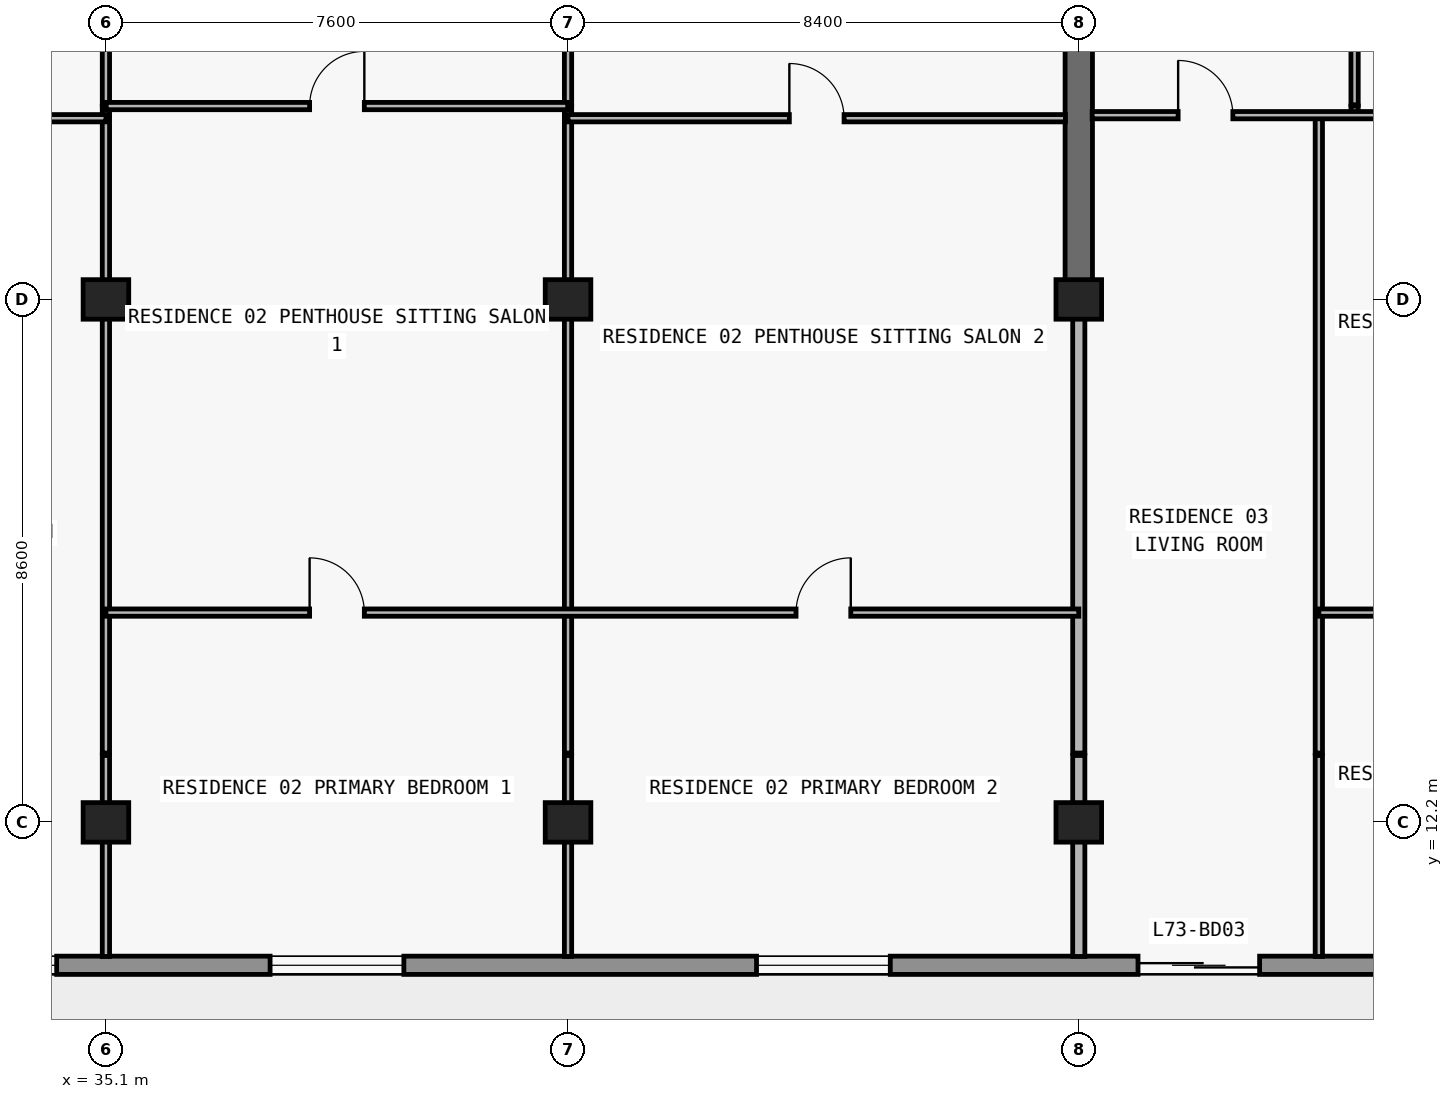
"""IFC4 building model, lengths in metres.
Left out: names, types, materials, properties, quantities, classifications, styles, units other than length and angle.
Written with IfcOpenShell. Run it as: python <this file> out.ifc"""

import sys

from ifc_helpers import new_model, si_unit, direction, frame, frame_2d, origin, origin_2d, place, context, subcontext, project, spatial, rectangle, extrude, element, fill, save


model = new_model("IFC4")
c1 = context("Model", 3, precision=1e-05, world=origin(), true_north=direction((0.0, 1.0)))
c2 = subcontext(c1, "Body", "Model", "MODEL_VIEW")
j1 = project(units=[si_unit("LENGTHUNIT", "METRE"), si_unit("PLANEANGLEUNIT", "RADIAN")], contexts=[c1])
p1 = place(None, origin())
s1 = spatial("IfcSite", under=j1, at=p1, CompositionType="ELEMENT")
p2 = place(p1, origin())
s2 = spatial("IfcBuilding", under=s1, at=p2, CompositionType="ELEMENT")
p3 = place(p2, frame((0.0, 0.0, 259.5)))
s3 = spatial("IfcBuildingStorey", under=s2, at=p3, CompositionType="ELEMENT", Elevation=259.5)
for number, where, z_axis, x_axis in (
    (1, (35.1, 12.2, 0.0), (0.0, 0.0, 1.0), (1.0, 0.0, 0.0)),
    (2, (42.7, 12.2, 0.0), (0.0, 0.0, 1.0), (1.0, 0.0, 0.0)),
    (3, (51.1, 12.2, 0.0), (0.0, 0.0, 1.0), (1.0, 0.0, 0.0)),
    (4, (35.1, 20.8, 0.0), (0.0, 0.0, 1.0), (1.0, 0.0, 0.0)),
    (5, (42.7, 20.8, 0.0), (0.0, 0.0, 1.0), (1.0, 0.0, 0.0)),
    (6, (51.1, 20.8, 0.0), (0.0, 0.0, 1.0), (1.0, 0.0, 0.0)),
):
    element("IfcColumn", number, at=place(p3, frame(where, z_axis=z_axis, x_axis=x_axis)), inside=s3, PredefinedType="COLUMN", context=c2, shape_type="SweptSolid", body=[
        extrude(rectangle(XDim=0.75, YDim=0.65, at=origin_2d()), origin(), (0.0, 0.0, 1.0), 3.05),
    ])
p4 = place(p3, frame((51.1, 20.8, 0.0), z_axis=(0.0, 0.0, 1.0), x_axis=(0.0, 1.0, 0.0)))
e7 = element("IfcWall", 7, at=p4, inside=s3, PredefinedType="SHEAR", context=c2, shape_type="SweptSolid", body=[
    extrude(rectangle(XDim=8.6, YDim=0.45, at=frame_2d((4.3, 0.0))), origin(), (0.0, 0.0, 1.0), 3.05),
])
p5 = place(p3, frame((65.7, 9.85, 0.0), z_axis=(0.0, 0.0, 1.0), x_axis=(-1.0, 0.0, 0.0)))
e8 = element("IfcWall", 8, at=p5, inside=s3, PredefinedType="STANDARD", context=c2, shape_type="SweptSolid", body=[
    extrude(rectangle(XDim=53.6, YDim=0.3, at=frame_2d((26.8, 0.0))), origin(), (0.0, 0.0, 1.0), 3.05),
])
p6 = place(p5, frame((49.5, 0.0, 0.0)))
e9 = element("IfcOpeningElement", 9, at=p6, cuts=e8, PredefinedType="OPENING", context=c2, shape_type="SweptSolid", body=[
    extrude(rectangle(XDim=2.0, YDim=2.3, at=frame_2d((1.0, 1.15))), frame((0.0, 0.16, 0.0), z_axis=(0.0, -1.0, 0.0), x_axis=(1.0, 0.0, 0.0)), (0.0, 0.0, 1.0), 0.32),
])
p7 = place(p5, frame((42.1, 0.0, 0.85)))
e10 = element("IfcOpeningElement", 10, at=p7, cuts=e8, PredefinedType="OPENING", context=c2, shape_type="SweptSolid", body=[
    extrude(rectangle(XDim=2.2, YDim=1.55, at=frame_2d((1.1, 0.775))), frame((0.0, 0.16, 0.0), z_axis=(0.0, -1.0, 0.0), x_axis=(1.0, 0.0, 0.0)), (0.0, 0.0, 1.0), 0.32),
])
p8 = place(p5, frame((36.09, 0.0, 0.0)))
e11 = element("IfcOpeningElement", 11, at=p8, cuts=e8, PredefinedType="OPENING", context=c2, shape_type="SweptSolid", body=[
    extrude(rectangle(XDim=2.0, YDim=2.3, at=frame_2d((1.0, 1.15))), frame((0.0, 0.16, 0.0), z_axis=(0.0, -1.0, 0.0), x_axis=(1.0, 0.0, 0.0)), (0.0, 0.0, 1.0), 0.32),
])
p9 = place(p5, frame((31.41, 0.0, 0.65)))
e12 = element("IfcOpeningElement", 12, at=p9, cuts=e8, PredefinedType="OPENING", context=c2, shape_type="SweptSolid", body=[
    extrude(rectangle(XDim=2.6, YDim=1.85, at=frame_2d((1.3, 0.925))), frame((0.0, 0.16, 0.0), z_axis=(0.0, -1.0, 0.0), x_axis=(1.0, 0.0, 0.0)), (0.0, 0.0, 1.0), 0.32),
])
p10 = place(p5, frame((25.7, 0.0, 0.85)))
e13 = element("IfcOpeningElement", 13, at=p10, cuts=e8, PredefinedType="OPENING", context=c2, shape_type="SweptSolid", body=[
    extrude(rectangle(XDim=2.2, YDim=1.55, at=frame_2d((1.1, 0.775))), frame((0.0, 0.16, 0.0), z_axis=(0.0, -1.0, 0.0), x_axis=(1.0, 0.0, 0.0)), (0.0, 0.0, 1.0), 0.32),
])
p11 = place(p5, frame((17.7, 0.0, 0.85)))
e14 = element("IfcOpeningElement", 14, at=p11, cuts=e8, PredefinedType="OPENING", context=c2, shape_type="SweptSolid", body=[
    extrude(rectangle(XDim=2.2, YDim=1.55, at=frame_2d((1.1, 0.775))), frame((0.0, 0.16, 0.0), z_axis=(0.0, -1.0, 0.0), x_axis=(1.0, 0.0, 0.0)), (0.0, 0.0, 1.0), 0.32),
])
p12 = place(p5, frame((11.626, 0.0, 0.0)))
e15 = element("IfcOpeningElement", 15, at=p12, cuts=e8, PredefinedType="OPENING", context=c2, shape_type="SweptSolid", body=[
    extrude(rectangle(XDim=2.0, YDim=2.3, at=frame_2d((1.0, 1.15))), frame((0.0, 0.16, 0.0), z_axis=(0.0, -1.0, 0.0), x_axis=(1.0, 0.0, 0.0)), (0.0, 0.0, 1.0), 0.32),
])
p13 = place(p5, frame((7.326, 0.0, 0.85)))
e16 = element("IfcOpeningElement", 16, at=p13, cuts=e8, PredefinedType="OPENING", context=c2, shape_type="SweptSolid", body=[
    extrude(rectangle(XDim=2.2, YDim=1.55, at=frame_2d((1.1, 0.775))), frame((0.0, 0.16, 0.0), z_axis=(0.0, -1.0, 0.0), x_axis=(1.0, 0.0, 0.0)), (0.0, 0.0, 1.0), 0.32),
])
p14 = place(p3, frame((35.1, 9.995, 0.0), z_axis=(0.0, 0.0, 1.0), x_axis=(0.0, 1.0, 0.0)))
e17 = element("IfcWall", 17, at=p14, inside=s3, PredefinedType="PARTITIONING", context=c2, shape_type="SweptSolid", body=[
    extrude(rectangle(XDim=3.305, YDim=0.12, at=frame_2d((1.652, 0.0))), origin(), (0.0, 0.0, 1.0), 2.263),
])
p15 = place(p3, frame((35.1, 13.34, 0.0), z_axis=(0.0, 0.0, 1.0), x_axis=(0.0, 1.0, 0.0)))
e18 = element("IfcWall", 18, at=p15, inside=s3, PredefinedType="PARTITIONING", context=c2, shape_type="SweptSolid", body=[
    extrude(rectangle(XDim=10.44, YDim=0.12, at=frame_2d((5.22, 0.0))), origin(), (0.0, 0.0, 1.0), 2.263),
])
p16 = place(p3, frame((35.1, 23.83, 0.0), z_axis=(0.0, 0.0, 1.0), x_axis=(0.0, 1.0, 0.0)))
e19 = element("IfcWall", 19, at=p16, inside=s3, PredefinedType="PARTITIONING", context=c2, shape_type="SweptSolid", body=[
    extrude(rectangle(XDim=0.15, YDim=0.12, at=frame_2d((0.075, 0.0))), origin(), (0.0, 0.0, 1.0), 2.263),
])
p17 = place(p3, frame((35.1, 24.0, 0.0), z_axis=(0.0, 0.0, 1.0), x_axis=(0.0, 1.0, 0.0)))
e20 = element("IfcWall", 20, at=p17, inside=s3, PredefinedType="PARTITIONING", context=c2, shape_type="SweptSolid", body=[
    extrude(rectangle(XDim=4.58, YDim=0.12, at=frame_2d((2.29, 0.0))), origin(), (0.0, 0.0, 1.0), 2.263),
])
p18 = place(p17, frame((1.74, 0.0, 0.0)))
e21 = element("IfcOpeningElement", 21, at=p18, cuts=e20, PredefinedType="OPENING", context=c2, shape_type="SweptSolid", body=[
    extrude(rectangle(XDim=0.9, YDim=2.15, at=frame_2d((0.45, 1.075))), frame((0.0, 0.07, 0.0), z_axis=(0.0, -1.0, 0.0), x_axis=(1.0, 0.0, 0.0)), (0.0, 0.0, 1.0), 0.14),
])
p19 = place(p3, frame((42.7, 9.995, 0.0), z_axis=(0.0, 0.0, 1.0), x_axis=(0.0, 1.0, 0.0)))
e22 = element("IfcWall", 22, at=p19, inside=s3, PredefinedType="PARTITIONING", context=c2, shape_type="SweptSolid", body=[
    extrude(rectangle(XDim=3.305, YDim=0.12, at=frame_2d((1.652, 0.0))), origin(), (0.0, 0.0, 1.0), 2.263),
])
p20 = place(p3, frame((42.7, 13.34, 0.0), z_axis=(0.0, 0.0, 1.0), x_axis=(0.0, 1.0, 0.0)))
e23 = element("IfcWall", 23, at=p20, inside=s3, PredefinedType="PARTITIONING", context=c2, shape_type="SweptSolid", body=[
    extrude(rectangle(XDim=10.44, YDim=0.12, at=frame_2d((5.22, 0.0))), origin(), (0.0, 0.0, 1.0), 2.263),
])
p21 = place(p3, frame((42.7, 23.83, 0.0), z_axis=(0.0, 0.0, 1.0), x_axis=(0.0, 1.0, 0.0)))
e24 = element("IfcWall", 24, at=p21, inside=s3, PredefinedType="PARTITIONING", context=c2, shape_type="SweptSolid", body=[
    extrude(rectangle(XDim=0.15, YDim=0.12, at=frame_2d((0.075, 0.0))), origin(), (0.0, 0.0, 1.0), 2.263),
])
p22 = place(p3, frame((42.7, 24.0, 0.0), z_axis=(0.0, 0.0, 1.0), x_axis=(0.0, 1.0, 0.0)))
e25 = element("IfcWall", 25, at=p22, inside=s3, PredefinedType="PARTITIONING", context=c2, shape_type="SweptSolid", body=[
    extrude(rectangle(XDim=4.58, YDim=0.12, at=frame_2d((2.29, 0.0))), origin(), (0.0, 0.0, 1.0), 2.263),
])
p23 = place(p22, frame((1.74, 0.0, 0.0)))
e26 = element("IfcOpeningElement", 26, at=p23, cuts=e25, PredefinedType="OPENING", context=c2, shape_type="SweptSolid", body=[
    extrude(rectangle(XDim=0.9, YDim=2.15, at=frame_2d((0.45, 1.075))), frame((0.0, 0.07, 0.0), z_axis=(0.0, -1.0, 0.0), x_axis=(1.0, 0.0, 0.0)), (0.0, 0.0, 1.0), 0.14),
])
p24 = place(p3, frame((51.1, 9.995, 0.0), z_axis=(0.0, 0.0, 1.0), x_axis=(0.0, 1.0, 0.0)))
e27 = element("IfcWall", 27, at=p24, inside=s3, PredefinedType="PARTITIONING", context=c2, shape_type="SweptSolid", body=[
    extrude(rectangle(XDim=3.305, YDim=0.2, at=frame_2d((1.652, 0.0))), origin(), (0.0, 0.0, 1.0), 2.263),
])
p25 = place(p3, frame((51.1, 13.34, 0.0), z_axis=(0.0, 0.0, 1.0), x_axis=(0.0, 1.0, 0.0)))
e28 = element("IfcWall", 28, at=p25, inside=s3, PredefinedType="PARTITIONING", context=c2, shape_type="SweptSolid", body=[
    extrude(rectangle(XDim=7.455, YDim=0.2, at=frame_2d((3.728, 0.0))), origin(), (0.0, 0.0, 1.0), 2.263),
])
p26 = place(p3, frame((55.048, 9.995, 0.0), z_axis=(0.0, 0.0, 1.0), x_axis=(0.0, 1.0, 0.0)))
e29 = element("IfcWall", 29, at=p26, inside=s3, PredefinedType="PARTITIONING", context=c2, shape_type="SweptSolid", body=[
    extrude(rectangle(XDim=3.305, YDim=0.12, at=frame_2d((1.652, 0.0))), origin(), (0.0, 0.0, 1.0), 3.05),
])
p27 = place(p3, frame((55.048, 13.34, 0.0), z_axis=(0.0, 0.0, 1.0), x_axis=(0.0, 1.0, 0.0)))
e30 = element("IfcWall", 30, at=p27, inside=s3, PredefinedType="PARTITIONING", context=c2, shape_type="SweptSolid", body=[
    extrude(rectangle(XDim=10.44, YDim=0.12, at=frame_2d((5.22, 0.0))), origin(), (0.0, 0.0, 1.0), 3.05),
])
p28 = place(p3, frame((55.636, 23.83, 0.0), z_axis=(0.0, 0.0, 1.0), x_axis=(0.0, 1.0, 0.0)))
e31 = element("IfcWall", 31, at=p28, inside=s3, PredefinedType="PARTITIONING", context=c2, shape_type="SweptSolid", body=[
    extrude(rectangle(XDim=0.15, YDim=0.12, at=frame_2d((0.075, 0.0))), origin(), (0.0, 0.0, 1.0), 3.05),
])
p29 = place(p3, frame((55.636, 24.0, 0.0), z_axis=(0.0, 0.0, 1.0), x_axis=(0.0, 1.0, 0.0)))
e32 = element("IfcWall", 32, at=p29, inside=s3, PredefinedType="PARTITIONING", context=c2, shape_type="SweptSolid", body=[
    extrude(rectangle(XDim=4.58, YDim=0.12, at=frame_2d((2.29, 0.0))), origin(), (0.0, 0.0, 1.0), 3.05),
])
p30 = place(p29, frame((1.84, 0.0, 0.0)))
e33 = element("IfcOpeningElement", 33, at=p30, cuts=e32, PredefinedType="OPENING", context=c2, shape_type="SweptSolid", body=[
    extrude(rectangle(XDim=0.9, YDim=2.15, at=frame_2d((0.45, 1.075))), frame((0.0, 0.07, 0.0), z_axis=(0.0, -1.0, 0.0), x_axis=(1.0, 0.0, 0.0)), (0.0, 0.0, 1.0), 0.14),
])
p31 = place(p3, frame((35.1, 15.65, 0.0), z_axis=(0.0, 0.0, 1.0), x_axis=(1.0, 0.0, 0.0)))
e34 = element("IfcWall", 34, at=p31, inside=s3, PredefinedType="PARTITIONING", context=c2, shape_type="SweptSolid", body=[
    extrude(rectangle(XDim=16.0, YDim=0.12, at=frame_2d((8.0, 0.0))), origin(), (0.0, 0.0, 1.0), 3.05),
])
p32 = place(p31, frame((3.35, 0.0, 0.0)))
e35 = element("IfcOpeningElement", 35, at=p32, cuts=e34, PredefinedType="OPENING", context=c2, shape_type="SweptSolid", body=[
    extrude(rectangle(XDim=0.9, YDim=2.15, at=frame_2d((0.45, 1.075))), frame((0.0, 0.07, 0.0), z_axis=(0.0, -1.0, 0.0), x_axis=(1.0, 0.0, 0.0)), (0.0, 0.0, 1.0), 0.14),
])
p33 = place(p31, frame((11.35, 0.0, 0.0)))
e36 = element("IfcOpeningElement", 36, at=p33, cuts=e34, PredefinedType="OPENING", context=c2, shape_type="SweptSolid", body=[
    extrude(rectangle(XDim=0.9, YDim=2.15, at=frame_2d((0.45, 1.075))), frame((0.0, 0.07, 0.0), z_axis=(0.0, -1.0, 0.0), x_axis=(1.0, 0.0, 0.0)), (0.0, 0.0, 1.0), 0.14),
])
p34 = place(p3, frame((55.048, 15.65, 0.0), z_axis=(0.0, 0.0, 1.0), x_axis=(1.0, 0.0, 0.0)))
e37 = element("IfcWall", 37, at=p34, inside=s3, PredefinedType="PARTITIONING", context=c2, shape_type="SweptSolid", body=[
    extrude(rectangle(XDim=4.452, YDim=0.12, at=frame_2d((2.226, 0.0))), origin(), (0.0, 0.0, 1.0), 3.05),
])
p35 = place(p34, frame((1.776, 0.0, 0.0)))
e38 = element("IfcOpeningElement", 38, at=p35, cuts=e37, PredefinedType="OPENING", context=c2, shape_type="SweptSolid", body=[
    extrude(rectangle(XDim=0.9, YDim=2.15, at=frame_2d((0.45, 1.075))), frame((0.0, 0.07, 0.0), z_axis=(0.0, -1.0, 0.0), x_axis=(1.0, 0.0, 0.0)), (0.0, 0.0, 1.0), 0.14),
])
p36 = place(p3, frame((26.92, 23.78, 0.0), z_axis=(0.0, 0.0, 1.0), x_axis=(1.0, 0.0, 0.0)))
e39 = element("IfcWall", 39, at=p36, inside=s3, PredefinedType="PARTITIONING", context=c2, shape_type="SweptSolid", body=[
    extrude(rectangle(XDim=8.18, YDim=0.12, at=frame_2d((4.09, 0.0))), origin(), (0.0, 0.0, 1.0), 3.05),
])
p37 = place(p36, frame((1.204, 0.0, 0.0)))
e40 = element("IfcOpeningElement", 40, at=p37, cuts=e39, PredefinedType="OPENING", context=c2, shape_type="SweptSolid", body=[
    extrude(rectangle(XDim=0.9, YDim=2.15, at=frame_2d((0.45, 1.075))), frame((0.0, 0.07, 0.0), z_axis=(0.0, -1.0, 0.0), x_axis=(1.0, 0.0, 0.0)), (0.0, 0.0, 1.0), 0.14),
])
p38 = place(p3, frame((42.7, 23.78, 0.0), z_axis=(0.0, 0.0, 1.0), x_axis=(1.0, 0.0, 0.0)))
e41 = element("IfcWall", 41, at=p38, inside=s3, PredefinedType="PARTITIONING", context=c2, shape_type="SweptSolid", body=[
    extrude(rectangle(XDim=8.18, YDim=0.12, at=frame_2d((4.09, 0.0))), origin(), (0.0, 0.0, 1.0), 3.05),
])
p39 = place(p38, frame((3.64, 0.0, 0.0)))
e42 = element("IfcOpeningElement", 42, at=p39, cuts=e41, PredefinedType="OPENING", context=c2, shape_type="SweptSolid", body=[
    extrude(rectangle(XDim=0.9, YDim=2.15, at=frame_2d((0.45, 1.075))), frame((0.0, 0.07, 0.0), z_axis=(0.0, -1.0, 0.0), x_axis=(1.0, 0.0, 0.0)), (0.0, 0.0, 1.0), 0.14),
])
p40 = place(p3, frame((51.32, 23.83, 0.0), z_axis=(0.0, 0.0, 1.0), x_axis=(1.0, 0.0, 0.0)))
e43 = element("IfcWall", 43, at=p40, inside=s3, PredefinedType="PARTITIONING", context=c2, shape_type="SweptSolid", body=[
    extrude(rectangle(XDim=8.18, YDim=0.12, at=frame_2d((4.09, 0.0))), origin(), (0.0, 0.0, 1.0), 3.05),
])
p41 = place(p40, frame((1.414, 0.0, 0.0)))
e44 = element("IfcOpeningElement", 44, at=p41, cuts=e43, PredefinedType="OPENING", context=c2, shape_type="SweptSolid", body=[
    extrude(rectangle(XDim=0.9, YDim=2.15, at=frame_2d((0.45, 1.075))), frame((0.0, 0.07, 0.0), z_axis=(0.0, -1.0, 0.0), x_axis=(1.0, 0.0, 0.0)), (0.0, 0.0, 1.0), 0.14),
])
p42 = place(p40, frame((5.798, 0.0, 0.0)))
e45 = element("IfcOpeningElement", 45, at=p42, cuts=e43, PredefinedType="OPENING", context=c2, shape_type="SweptSolid", body=[
    extrude(rectangle(XDim=0.9, YDim=2.15, at=frame_2d((0.45, 1.075))), frame((0.0, 0.07, 0.0), z_axis=(0.0, -1.0, 0.0), x_axis=(1.0, 0.0, 0.0)), (0.0, 0.0, 1.0), 0.14),
])
p43 = place(p3, frame((35.105, 23.98, 0.0), z_axis=(0.0, 0.0, 1.0), x_axis=(1.0, 0.0, 0.0)))
e46 = element("IfcWall", 46, at=p43, inside=s3, PredefinedType="PARTITIONING", context=c2, shape_type="SweptSolid", body=[
    extrude(rectangle(XDim=7.59, YDim=0.12, at=frame_2d((3.795, 0.0))), origin(), (0.0, 0.0, 1.0), 3.05),
])
p44 = place(p43, frame((3.345, 0.0, 0.0)))
e47 = element("IfcOpeningElement", 47, at=p44, cuts=e46, PredefinedType="OPENING", context=c2, shape_type="SweptSolid", body=[
    extrude(rectangle(XDim=0.9, YDim=2.15, at=frame_2d((0.45, 1.075))), frame((0.0, 0.07, 0.0), z_axis=(0.0, -1.0, 0.0), x_axis=(1.0, 0.0, 0.0)), (0.0, 0.0, 1.0), 0.14),
])
p45 = place(p9, origin())
e48 = element("IfcWindow", 48, at=p45, inside=s3, PartitioningType="SINGLE_PANEL", PredefinedType="WINDOW", context=c2, shape_type="SweptSolid", body=[
    extrude(rectangle(XDim=2.6, YDim=1.85, at=frame_2d((1.3, 0.925))), frame((0.0, 0.03, 0.0), z_axis=(0.0, -1.0, 0.0), x_axis=(1.0, 0.0, 0.0)), (0.0, 0.0, 1.0), 0.06),
])
fill(e12, e48)
p46 = place(p10, origin())
e49 = element("IfcWindow", 49, at=p46, inside=s3, PartitioningType="SINGLE_PANEL", PredefinedType="WINDOW", context=c2, shape_type="SweptSolid", body=[
    extrude(rectangle(XDim=2.2, YDim=1.55, at=frame_2d((1.1, 0.775))), frame((0.0, 0.03, 0.0), z_axis=(0.0, -1.0, 0.0), x_axis=(1.0, 0.0, 0.0)), (0.0, 0.0, 1.0), 0.06),
])
fill(e13, e49)
p47 = place(p11, origin())
e50 = element("IfcWindow", 50, at=p47, inside=s3, PartitioningType="SINGLE_PANEL", PredefinedType="WINDOW", context=c2, shape_type="SweptSolid", body=[
    extrude(rectangle(XDim=2.2, YDim=1.55, at=frame_2d((1.1, 0.775))), frame((0.0, 0.03, 0.0), z_axis=(0.0, -1.0, 0.0), x_axis=(1.0, 0.0, 0.0)), (0.0, 0.0, 1.0), 0.06),
])
fill(e14, e50)
p48 = place(p12, origin())
e51 = element("IfcDoor", 51, at=p48, inside=s3, OperationType="DOUBLE_DOOR_SLIDING", PredefinedType="DOOR", context=c2, shape_type="SweptSolid", body=[
    extrude(rectangle(XDim=2.0, YDim=2.3, at=frame_2d((1.0, 1.15))), frame((0.0, 0.025, 0.0), z_axis=(0.0, -1.0, 0.0), x_axis=(1.0, 0.0, 0.0)), (0.0, 0.0, 1.0), 0.05),
])
fill(e15, e51)
p49 = place(p44, origin())
e52 = element("IfcDoor", 52, at=p49, inside=s3, OperationType="SINGLE_SWING_RIGHT", PredefinedType="DOOR", context=c2, shape_type="SweptSolid", body=[
    extrude(rectangle(XDim=0.9, YDim=2.15, at=frame_2d((0.45, 1.075))), frame((0.0, 0.025, 0.0), z_axis=(0.0, -1.0, 0.0), x_axis=(1.0, 0.0, 0.0)), (0.0, 0.0, 1.0), 0.05),
])
fill(e47, e52)
p50 = place(p32, origin())
e53 = element("IfcDoor", 53, at=p50, inside=s3, OperationType="SINGLE_SWING_LEFT", PredefinedType="DOOR", context=c2, shape_type="SweptSolid", body=[
    extrude(rectangle(XDim=0.9, YDim=2.15, at=frame_2d((0.45, 1.075))), frame((0.0, 0.025, 0.0), z_axis=(0.0, -1.0, 0.0), x_axis=(1.0, 0.0, 0.0)), (0.0, 0.0, 1.0), 0.05),
])
fill(e35, e53)
p51 = place(p39, origin())
e54 = element("IfcDoor", 54, at=p51, inside=s3, OperationType="SINGLE_SWING_LEFT", PredefinedType="DOOR", context=c2, shape_type="SweptSolid", body=[
    extrude(rectangle(XDim=0.9, YDim=2.15, at=frame_2d((0.45, 1.075))), frame((0.0, 0.025, 0.0), z_axis=(0.0, -1.0, 0.0), x_axis=(1.0, 0.0, 0.0)), (0.0, 0.0, 1.0), 0.05),
])
fill(e42, e54)
p52 = place(p33, origin())
e55 = element("IfcDoor", 55, at=p52, inside=s3, OperationType="SINGLE_SWING_RIGHT", PredefinedType="DOOR", context=c2, shape_type="SweptSolid", body=[
    extrude(rectangle(XDim=0.9, YDim=2.15, at=frame_2d((0.45, 1.075))), frame((0.0, 0.025, 0.0), z_axis=(0.0, -1.0, 0.0), x_axis=(1.0, 0.0, 0.0)), (0.0, 0.0, 1.0), 0.05),
])
fill(e36, e55)
p53 = place(p41, origin())
e56 = element("IfcDoor", 56, at=p53, inside=s3, OperationType="SINGLE_SWING_LEFT", PredefinedType="DOOR", context=c2, shape_type="SweptSolid", body=[
    extrude(rectangle(XDim=0.9, YDim=2.15, at=frame_2d((0.45, 1.075))), frame((0.0, 0.025, 0.0), z_axis=(0.0, -1.0, 0.0), x_axis=(1.0, 0.0, 0.0)), (0.0, 0.0, 1.0), 0.05),
])
fill(e44, e56)
save(model, sys.argv[1])
